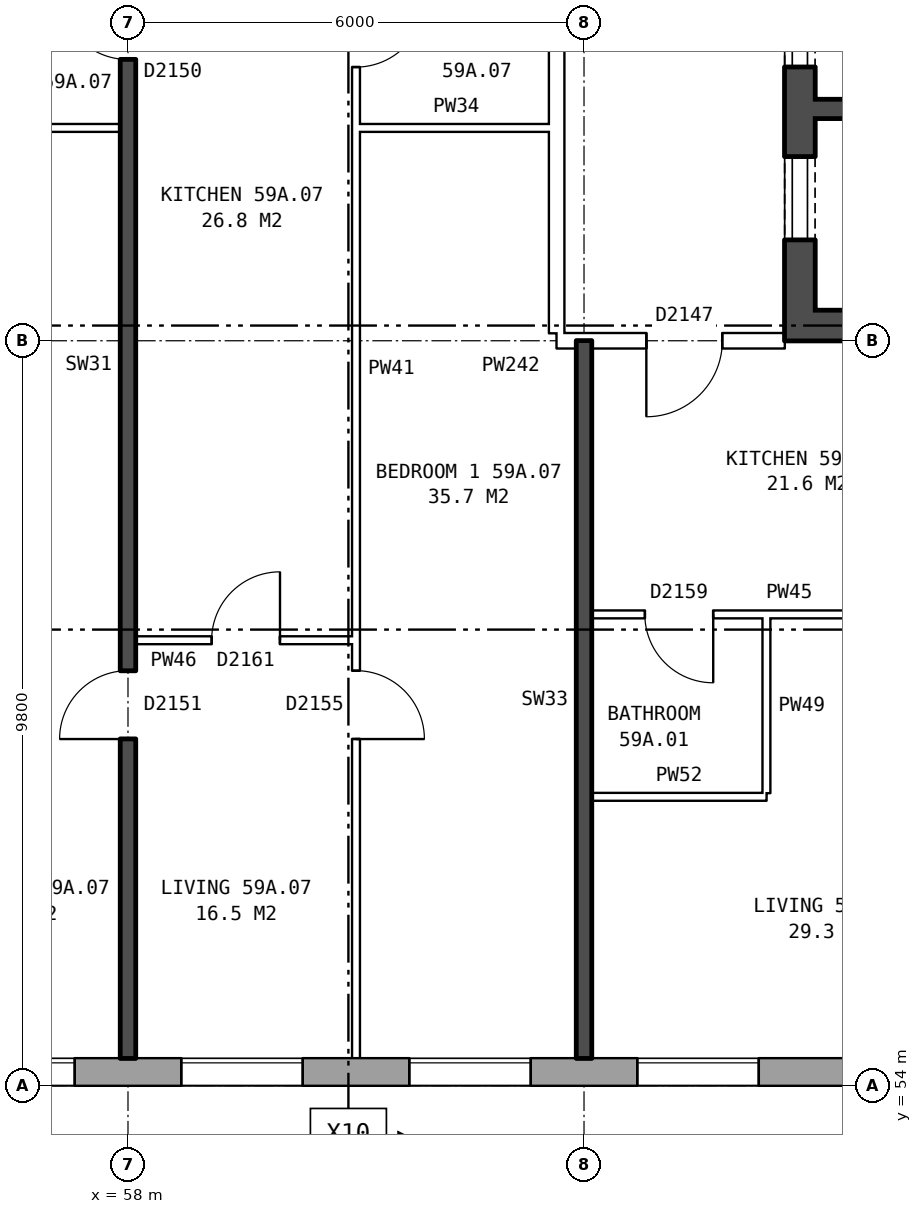
"""IFC4 building model, lengths in metres.
Left out: names, types, materials, properties, quantities, classifications, styles, units other than length and angle.
Written with IfcOpenShell. Run it as: python <this file> out.ifc"""

import sys

from ifc_helpers import new_model, si_unit, direction, frame, frame_2d, origin, place, context, subcontext, project, spatial, rectangle, extrude, element, fill, save


model = new_model("IFC4")
c1 = context("Model", 3, precision=1e-05, world=origin(), true_north=direction((0.0, 1.0)))
c2 = subcontext(c1, "Body", "Model", "MODEL_VIEW")
j1 = project(units=[si_unit("LENGTHUNIT", "METRE"), si_unit("PLANEANGLEUNIT", "RADIAN")], contexts=[c1])
p1 = place(None, origin())
s1 = spatial("IfcSite", under=j1, at=p1, CompositionType="ELEMENT")
p2 = place(p1, origin())
s2 = spatial("IfcBuilding", under=s1, at=p2, CompositionType="ELEMENT")
p3 = place(p2, frame((0.0, 0.0, 209.0)))
s3 = spatial("IfcBuildingStorey", under=s2, at=p3, CompositionType="ELEMENT", Elevation=209.0)
p4 = place(p3, frame((35.075, 54.18, 0.0), z_axis=(0.0, 0.0, 1.0), x_axis=(1.0, 0.0, 0.0)))
e1 = element("IfcWall", 1, at=p4, inside=s3, PredefinedType="STANDARD", context=c2, shape_type="SweptSolid", body=[
    extrude(rectangle(XDim=39.875, YDim=0.36, at=frame_2d((19.938, 0.0))), origin(), (0.0, 0.0, 1.0), 2.85),
])
p5 = place(p4, frame((0.3, 0.0, 0.8)))
e2 = element("IfcOpeningElement", 2, at=p5, cuts=e1, PredefinedType="OPENING", context=c2, shape_type="SweptSolid", body=[
    extrude(rectangle(XDim=1.0, YDim=1.8, at=frame_2d((0.5, 0.9))), frame((0.0, 0.19, 0.0), z_axis=(0.0, -1.0, 0.0), x_axis=(1.0, 0.0, 0.0)), (0.0, 0.0, 1.0), 0.38),
])
p6 = place(p4, frame((5.625, 0.0, 0.8)))
e3 = element("IfcOpeningElement", 3, at=p6, cuts=e1, PredefinedType="OPENING", context=c2, shape_type="SweptSolid", body=[
    extrude(rectangle(XDim=1.6, YDim=1.8, at=frame_2d((0.8, 0.9))), frame((0.0, 0.19, 0.0), z_axis=(0.0, -1.0, 0.0), x_axis=(1.0, 0.0, 0.0)), (0.0, 0.0, 1.0), 0.38),
])
p7 = place(p4, frame((8.625, 0.0, 0.8)))
e4 = element("IfcOpeningElement", 4, at=p7, cuts=e1, PredefinedType="OPENING", context=c2, shape_type="SweptSolid", body=[
    extrude(rectangle(XDim=1.6, YDim=1.8, at=frame_2d((0.8, 0.9))), frame((0.0, 0.19, 0.0), z_axis=(0.0, -1.0, 0.0), x_axis=(1.0, 0.0, 0.0)), (0.0, 0.0, 1.0), 0.38),
])
p8 = place(p4, frame((11.625, 0.0, 0.8)))
e5 = element("IfcOpeningElement", 5, at=p8, cuts=e1, PredefinedType="OPENING", context=c2, shape_type="SweptSolid", body=[
    extrude(rectangle(XDim=1.6, YDim=1.8, at=frame_2d((0.8, 0.9))), frame((0.0, 0.19, 0.0), z_axis=(0.0, -1.0, 0.0), x_axis=(1.0, 0.0, 0.0)), (0.0, 0.0, 1.0), 0.38),
])
p9 = place(p4, frame((14.625, 0.0, 0.8)))
e6 = element("IfcOpeningElement", 6, at=p9, cuts=e1, PredefinedType="OPENING", context=c2, shape_type="SweptSolid", body=[
    extrude(rectangle(XDim=1.6, YDim=1.8, at=frame_2d((0.8, 0.9))), frame((0.0, 0.19, 0.0), z_axis=(0.0, -1.0, 0.0), x_axis=(1.0, 0.0, 0.0)), (0.0, 0.0, 1.0), 0.38),
])
p10 = place(p4, frame((17.625, 0.0, 0.8)))
e7 = element("IfcOpeningElement", 7, at=p10, cuts=e1, PredefinedType="OPENING", context=c2, shape_type="SweptSolid", body=[
    extrude(rectangle(XDim=1.6, YDim=1.8, at=frame_2d((0.8, 0.9))), frame((0.0, 0.19, 0.0), z_axis=(0.0, -1.0, 0.0), x_axis=(1.0, 0.0, 0.0)), (0.0, 0.0, 1.0), 0.38),
])
p11 = place(p4, frame((20.625, 0.0, 0.8)))
e8 = element("IfcOpeningElement", 8, at=p11, cuts=e1, PredefinedType="OPENING", context=c2, shape_type="SweptSolid", body=[
    extrude(rectangle(XDim=1.6, YDim=1.8, at=frame_2d((0.8, 0.9))), frame((0.0, 0.19, 0.0), z_axis=(0.0, -1.0, 0.0), x_axis=(1.0, 0.0, 0.0)), (0.0, 0.0, 1.0), 0.38),
])
p12 = place(p4, frame((23.625, 0.0, 0.8)))
e9 = element("IfcOpeningElement", 9, at=p12, cuts=e1, PredefinedType="OPENING", context=c2, shape_type="SweptSolid", body=[
    extrude(rectangle(XDim=1.6, YDim=1.8, at=frame_2d((0.8, 0.9))), frame((0.0, 0.19, 0.0), z_axis=(0.0, -1.0, 0.0), x_axis=(1.0, 0.0, 0.0)), (0.0, 0.0, 1.0), 0.38),
])
p13 = place(p4, frame((26.625, 0.0, 0.8)))
e10 = element("IfcOpeningElement", 10, at=p13, cuts=e1, PredefinedType="OPENING", context=c2, shape_type="SweptSolid", body=[
    extrude(rectangle(XDim=1.6, YDim=1.8, at=frame_2d((0.8, 0.9))), frame((0.0, 0.19, 0.0), z_axis=(0.0, -1.0, 0.0), x_axis=(1.0, 0.0, 0.0)), (0.0, 0.0, 1.0), 0.38),
])
p14 = place(p4, frame((29.625, 0.0, 0.8)))
e11 = element("IfcOpeningElement", 11, at=p14, cuts=e1, PredefinedType="OPENING", context=c2, shape_type="SweptSolid", body=[
    extrude(rectangle(XDim=1.6, YDim=1.8, at=frame_2d((0.8, 0.9))), frame((0.0, 0.19, 0.0), z_axis=(0.0, -1.0, 0.0), x_axis=(1.0, 0.0, 0.0)), (0.0, 0.0, 1.0), 0.38),
])
p15 = place(p4, frame((32.625, 0.0, 0.8)))
e12 = element("IfcOpeningElement", 12, at=p15, cuts=e1, PredefinedType="OPENING", context=c2, shape_type="SweptSolid", body=[
    extrude(rectangle(XDim=1.6, YDim=1.8, at=frame_2d((0.8, 0.9))), frame((0.0, 0.19, 0.0), z_axis=(0.0, -1.0, 0.0), x_axis=(1.0, 0.0, 0.0)), (0.0, 0.0, 1.0), 0.38),
])
p16 = place(p4, frame((36.325, 0.0, 1.1)))
e13 = element("IfcOpeningElement", 13, at=p16, cuts=e1, PredefinedType="OPENING", context=c2, shape_type="SweptSolid", body=[
    extrude(rectangle(XDim=0.8, YDim=1.5, at=frame_2d((0.4, 0.75))), frame((0.0, 0.19, 0.0), z_axis=(0.0, -1.0, 0.0), x_axis=(1.0, 0.0, 0.0)), (0.0, 0.0, 1.0), 0.38),
])
p17 = place(p4, frame((3.65, 0.0, 0.8)))
e14 = element("IfcOpeningElement", 14, at=p17, cuts=e1, PredefinedType="OPENING", context=c2, shape_type="SweptSolid", body=[
    extrude(rectangle(XDim=1.0, YDim=1.8, at=frame_2d((0.5, 0.9))), frame((0.0, 0.19, 0.0), z_axis=(0.0, -1.0, 0.0), x_axis=(1.0, 0.0, 0.0)), (0.0, 0.0, 1.0), 0.38),
])
p18 = place(p4, frame((37.425, 0.0, 0.8)))
e15 = element("IfcOpeningElement", 15, at=p18, cuts=e1, PredefinedType="OPENING", context=c2, shape_type="SweptSolid", body=[
    extrude(rectangle(XDim=1.4, YDim=1.8, at=frame_2d((0.7, 0.9))), frame((0.0, 0.19, 0.0), z_axis=(0.0, -1.0, 0.0), x_axis=(1.0, 0.0, 0.0)), (0.0, 0.0, 1.0), 0.38),
])
p19 = place(p3, frame((66.84, 63.8, 0.0), z_axis=(0.0, 0.0, 1.0), x_axis=(0.0, 1.0, 0.0)))
e16 = element("IfcWall", 16, at=p19, inside=s3, PredefinedType="SHEAR", context=c2, shape_type="SweptSolid", body=[
    extrude(rectangle(XDim=12.4, YDim=0.4, at=frame_2d((6.2, 0.0))), origin(), (0.0, 0.0, 1.0), 2.85),
])
p20 = place(p19, frame((1.325, 0.0, 0.0)))
e17 = element("IfcOpeningElement", 17, at=p20, cuts=e16, PredefinedType="OPENING", context=c2, shape_type="SweptSolid", body=[
    extrude(rectangle(XDim=1.1, YDim=2.1, at=frame_2d((0.55, 1.05))), frame((0.0, 0.21, 0.0), z_axis=(0.0, -1.0, 0.0), x_axis=(1.0, 0.0, 0.0)), (0.0, 0.0, 1.0), 0.42),
])
p21 = place(p19, frame((3.6, 0.0, 0.0)))
e18 = element("IfcOpeningElement", 18, at=p21, cuts=e16, PredefinedType="OPENING", context=c2, shape_type="SweptSolid", body=[
    extrude(rectangle(XDim=1.1, YDim=2.1, at=frame_2d((0.55, 1.05))), frame((0.0, 0.21, 0.0), z_axis=(0.0, -1.0, 0.0), x_axis=(1.0, 0.0, 0.0)), (0.0, 0.0, 1.0), 0.42),
])
p22 = place(p19, frame((5.8, 0.0, 0.0)))
e19 = element("IfcOpeningElement", 19, at=p22, cuts=e16, PredefinedType="OPENING", context=c2, shape_type="SweptSolid", body=[
    extrude(rectangle(XDim=1.1, YDim=2.1, at=frame_2d((0.55, 1.05))), frame((0.0, 0.21, 0.0), z_axis=(0.0, -1.0, 0.0), x_axis=(1.0, 0.0, 0.0)), (0.0, 0.0, 1.0), 0.42),
])
p23 = place(p19, frame((8.0, 0.0, 0.0)))
e20 = element("IfcOpeningElement", 20, at=p23, cuts=e16, PredefinedType="OPENING", context=c2, shape_type="SweptSolid", body=[
    extrude(rectangle(XDim=1.1, YDim=2.1, at=frame_2d((0.55, 1.05))), frame((0.0, 0.21, 0.0), z_axis=(0.0, -1.0, 0.0), x_axis=(1.0, 0.0, 0.0)), (0.0, 0.0, 1.0), 0.42),
])
p24 = place(p19, frame((9.9, 0.0, 0.0)))
e21 = element("IfcOpeningElement", 21, at=p24, cuts=e16, PredefinedType="OPENING", context=c2, shape_type="SweptSolid", body=[
    extrude(rectangle(XDim=1.1, YDim=2.1, at=frame_2d((0.55, 1.05))), frame((0.0, 0.21, 0.0), z_axis=(0.0, -1.0, 0.0), x_axis=(1.0, 0.0, 0.0)), (0.0, 0.0, 1.0), 0.42),
])
p25 = place(p3, frame((67.04, 64.0, 0.0), z_axis=(0.0, 0.0, 1.0), x_axis=(1.0, 0.0, 0.0)))
e22 = element("IfcWall", 22, at=p25, inside=s3, PredefinedType="SHEAR", context=c2, shape_type="SweptSolid", body=[
    extrude(rectangle(XDim=8.2, YDim=0.4, at=frame_2d((4.1, 0.0))), origin(), (0.0, 0.0, 1.0), 2.85),
])
p26 = place(p3, frame((67.04, 66.85, 0.0), z_axis=(0.0, 0.0, 1.0), x_axis=(1.0, 0.0, 0.0)))
e23 = element("IfcWall", 23, at=p26, inside=s3, PredefinedType="SHEAR", context=c2, shape_type="SweptSolid", body=[
    extrude(rectangle(XDim=3.595, YDim=0.25, at=frame_2d((1.797, 0.0))), origin(), (0.0, 0.0, 1.0), 2.85),
])
p27 = place(p3, frame((63.64, 63.9, 0.0), z_axis=(0.0, 0.0, 1.0), x_axis=(0.0, 1.0, 0.0)))
e24 = element("IfcWall", 24, at=p27, inside=s3, PredefinedType="PARTITIONING", context=c2, shape_type="SweptSolid", body=[
    extrude(rectangle(XDim=12.2, YDim=0.2, at=frame_2d((6.1, 0.0))), origin(), (0.0, 0.0, 1.0), 2.85),
])
p28 = place(p27, frame((5.1, 0.0, 0.0)))
e25 = element("IfcOpeningElement", 25, at=p28, cuts=e24, PredefinedType="OPENING", context=c2, shape_type="SweptSolid", body=[
    extrude(rectangle(XDim=2.0, YDim=2.1, at=frame_2d((1.0, 1.05))), frame((0.0, 0.11, 0.0), z_axis=(0.0, -1.0, 0.0), x_axis=(1.0, 0.0, 0.0)), (0.0, 0.0, 1.0), 0.22),
])
p29 = place(p3, frame((64.1, 57.8, 0.0), z_axis=(0.0, 0.0, 1.0), x_axis=(1.0, 0.0, 0.0)))
e26 = element("IfcWall", 26, at=p29, inside=s3, PredefinedType="PARTITIONING", context=c2, shape_type="SweptSolid", body=[
    extrude(rectangle(XDim=2.3, YDim=0.1, at=frame_2d((1.15, 0.0))), origin(), (0.0, 0.0, 1.0), 2.85),
])
p30 = place(p3, frame((58.1, 59.86, 0.0), z_axis=(0.0, 0.0, 1.0), x_axis=(1.0, 0.0, 0.0)))
e27 = element("IfcWall", 27, at=p30, inside=s3, PredefinedType="PARTITIONING", context=c2, shape_type="SweptSolid", body=[
    extrude(rectangle(XDim=2.9, YDim=0.1, at=frame_2d((1.45, 0.0))), origin(), (0.0, 0.0, 1.0), 2.85),
])
p31 = place(p30, frame((1.0, 0.0, 0.0)))
e28 = element("IfcOpeningElement", 28, at=p31, cuts=e27, PredefinedType="OPENING", context=c2, shape_type="SweptSolid", body=[
    extrude(rectangle(XDim=0.9, YDim=2.1, at=frame_2d((0.45, 1.05))), frame((0.0, 0.06, 0.0), z_axis=(0.0, -1.0, 0.0), x_axis=(1.0, 0.0, 0.0)), (0.0, 0.0, 1.0), 0.12),
])
p32 = place(p3, frame((64.1, 60.2, 0.0), z_axis=(0.0, 0.0, 1.0), x_axis=(1.0, 0.0, 0.0)))
e29 = element("IfcWall", 29, at=p32, inside=s3, PredefinedType="PARTITIONING", context=c2, shape_type="SweptSolid", body=[
    extrude(rectangle(XDim=5.8, YDim=0.1, at=frame_2d((2.9, 0.0))), origin(), (0.0, 0.0, 1.0), 2.85),
])
p33 = place(p32, frame((3.6, 0.0, 0.0)))
e30 = element("IfcOpeningElement", 30, at=p33, cuts=e29, PredefinedType="OPENING", context=c2, shape_type="SweptSolid", body=[
    extrude(rectangle(XDim=0.9, YDim=2.1, at=frame_2d((0.45, 1.05))), frame((0.0, 0.06, 0.0), z_axis=(0.0, -1.0, 0.0), x_axis=(1.0, 0.0, 0.0)), (0.0, 0.0, 1.0), 0.12),
])
p34 = place(p32, frame((0.7, 0.0, 0.0)))
e31 = element("IfcOpeningElement", 31, at=p34, cuts=e29, PredefinedType="OPENING", context=c2, shape_type="SweptSolid", body=[
    extrude(rectangle(XDim=0.9, YDim=2.1, at=frame_2d((0.45, 1.05))), frame((0.0, 0.06, 0.0), z_axis=(0.0, -1.0, 0.0), x_axis=(1.0, 0.0, 0.0)), (0.0, 0.0, 1.0), 0.12),
])
p35 = place(p3, frame((63.64, 63.8, 0.0), z_axis=(0.0, 0.0, 1.0), x_axis=(1.0, 0.0, 0.0)))
e32 = element("IfcWall", 32, at=p35, inside=s3, PredefinedType="PARTITIONING", context=c2, shape_type="SweptSolid", body=[
    extrude(rectangle(XDim=3.0, YDim=0.2, at=frame_2d((1.5, 0.0))), origin(), (0.0, 0.0, 1.0), 2.85),
])
p36 = place(p35, frame((1.18, 0.0, 0.0)))
e33 = element("IfcOpeningElement", 33, at=p36, cuts=e32, PredefinedType="OPENING", context=c2, shape_type="SweptSolid", body=[
    extrude(rectangle(XDim=1.0, YDim=2.1, at=frame_2d((0.5, 1.05))), frame((0.0, 0.11, 0.0), z_axis=(0.0, -1.0, 0.0), x_axis=(1.0, 0.0, 0.0)), (0.0, 0.0, 1.0), 0.22),
])
p37 = place(p3, frame((52.1, 66.6, 0.0), z_axis=(0.0, 0.0, 1.0), x_axis=(1.0, 0.0, 0.0)))
e34 = element("IfcWall", 34, at=p37, inside=s3, PredefinedType="PARTITIONING", context=c2, shape_type="SweptSolid", body=[
    extrude(rectangle(XDim=5.8, YDim=0.1, at=frame_2d((2.9, 0.0))), origin(), (0.0, 0.0, 1.0), 2.85),
])
p38 = place(p3, frame((61.0, 66.6, 0.0), z_axis=(0.0, 0.0, 1.0), x_axis=(1.0, 0.0, 0.0)))
e35 = element("IfcWall", 35, at=p38, inside=s3, PredefinedType="PARTITIONING", context=c2, shape_type="SweptSolid", body=[
    extrude(rectangle(XDim=2.64, YDim=0.1, at=frame_2d((1.32, 0.0))), origin(), (0.0, 0.0, 1.0), 2.85),
])
p39 = place(p3, frame((58.0, 54.36, 0.0), z_axis=(0.0, 0.0, 1.0), x_axis=(0.0, 1.0, 0.0)))
e36 = element("IfcWall", 36, at=p39, inside=s3, PredefinedType="SOLIDWALL", context=c2, shape_type="SweptSolid", body=[
    extrude(rectangle(XDim=14.44, YDim=0.2, at=frame_2d((7.22, 0.0))), origin(), (0.0, 0.0, 1.0), 2.85),
])
p40 = place(p39, frame((4.2, 0.0, 0.0)))
e37 = element("IfcOpeningElement", 37, at=p40, cuts=e36, PredefinedType="OPENING", context=c2, shape_type="SweptSolid", body=[
    extrude(rectangle(XDim=0.9, YDim=2.1, at=frame_2d((0.45, 1.05))), frame((0.0, 0.11, 0.0), z_axis=(0.0, -1.0, 0.0), x_axis=(1.0, 0.0, 0.0)), (0.0, 0.0, 1.0), 0.22),
])
p41 = place(p39, frame((13.14, 0.0, 0.0)))
e38 = element("IfcOpeningElement", 38, at=p41, cuts=e36, PredefinedType="OPENING", context=c2, shape_type="SweptSolid", body=[
    extrude(rectangle(XDim=0.9, YDim=2.1, at=frame_2d((0.45, 1.05))), frame((0.0, 0.11, 0.0), z_axis=(0.0, -1.0, 0.0), x_axis=(1.0, 0.0, 0.0)), (0.0, 0.0, 1.0), 0.22),
])
p42 = place(p3, frame((61.0, 54.36, 0.0), z_axis=(0.0, 0.0, 1.0), x_axis=(0.0, 1.0, 0.0)))
e39 = element("IfcWall", 39, at=p42, inside=s3, PredefinedType="PARTITIONING", context=c2, shape_type="SweptSolid", body=[
    extrude(rectangle(XDim=14.34, YDim=0.1, at=frame_2d((7.17, 0.0))), origin(), (0.0, 0.0, 1.0), 2.85),
])
p43 = place(p42, frame((4.2, 0.0, 0.0)))
e40 = element("IfcOpeningElement", 40, at=p43, cuts=e39, PredefinedType="OPENING", context=c2, shape_type="SweptSolid", body=[
    extrude(rectangle(XDim=0.9, YDim=2.1, at=frame_2d((0.45, 1.05))), frame((0.0, 0.06, 0.0), z_axis=(0.0, -1.0, 0.0), x_axis=(1.0, 0.0, 0.0)), (0.0, 0.0, 1.0), 0.12),
])
p44 = place(p42, frame((13.04, 0.0, 0.0)))
e41 = element("IfcOpeningElement", 41, at=p44, cuts=e39, PredefinedType="OPENING", context=c2, shape_type="SweptSolid", body=[
    extrude(rectangle(XDim=0.9, YDim=2.1, at=frame_2d((0.45, 1.05))), frame((0.0, 0.06, 0.0), z_axis=(0.0, -1.0, 0.0), x_axis=(1.0, 0.0, 0.0)), (0.0, 0.0, 1.0), 0.12),
])
p45 = place(p3, frame((64.0, 54.36, 0.0), z_axis=(0.0, 0.0, 1.0), x_axis=(0.0, 1.0, 0.0)))
e42 = element("IfcWall", 42, at=p45, inside=s3, PredefinedType="SOLIDWALL", context=c2, shape_type="SweptSolid", body=[
    extrude(rectangle(XDim=9.44, YDim=0.2, at=frame_2d((4.72, 0.0))), origin(), (0.0, 0.0, 1.0), 2.85),
])
p46 = place(p3, frame((66.4, 57.85, 0.0), z_axis=(0.0, 0.0, 1.0), x_axis=(0.0, 1.0, 0.0)))
e43 = element("IfcWall", 43, at=p46, inside=s3, PredefinedType="PARTITIONING", context=c2, shape_type="SweptSolid", body=[
    extrude(rectangle(XDim=2.3, YDim=0.1, at=frame_2d((1.15, 0.0))), origin(), (0.0, 0.0, 1.0), 2.85),
])
p47 = place(p11, origin())
e44 = element("IfcWindow", 44, at=p47, inside=s3, PartitioningType="SINGLE_PANEL", PredefinedType="WINDOW", context=c2, shape_type="SweptSolid", body=[
    extrude(rectangle(XDim=1.6, YDim=1.8, at=frame_2d((0.8, 0.9))), frame((0.0, 0.15, 0.0), z_axis=(0.0, -1.0, 0.0), x_axis=(1.0, 0.0, 0.0)), (0.0, 0.0, 1.0), 0.06),
])
fill(e8, e44)
p48 = place(p12, origin())
e45 = element("IfcWindow", 45, at=p48, inside=s3, PartitioningType="SINGLE_PANEL", PredefinedType="WINDOW", context=c2, shape_type="SweptSolid", body=[
    extrude(rectangle(XDim=1.6, YDim=1.8, at=frame_2d((0.8, 0.9))), frame((0.0, 0.15, 0.0), z_axis=(0.0, -1.0, 0.0), x_axis=(1.0, 0.0, 0.0)), (0.0, 0.0, 1.0), 0.06),
])
fill(e9, e45)
p49 = place(p13, origin())
e46 = element("IfcWindow", 46, at=p49, inside=s3, PartitioningType="SINGLE_PANEL", PredefinedType="WINDOW", context=c2, shape_type="SweptSolid", body=[
    extrude(rectangle(XDim=1.6, YDim=1.8, at=frame_2d((0.8, 0.9))), frame((0.0, 0.15, 0.0), z_axis=(0.0, -1.0, 0.0), x_axis=(1.0, 0.0, 0.0)), (0.0, 0.0, 1.0), 0.06),
])
fill(e10, e46)
p50 = place(p14, origin())
e47 = element("IfcWindow", 47, at=p50, inside=s3, PartitioningType="SINGLE_PANEL", PredefinedType="WINDOW", context=c2, shape_type="SweptSolid", body=[
    extrude(rectangle(XDim=1.6, YDim=1.8, at=frame_2d((0.8, 0.9))), frame((0.0, 0.15, 0.0), z_axis=(0.0, -1.0, 0.0), x_axis=(1.0, 0.0, 0.0)), (0.0, 0.0, 1.0), 0.06),
])
fill(e11, e47)
p51 = place(p20, origin())
e48 = element("IfcDoor", 48, at=p51, inside=s3, OperationType="DOUBLE_DOOR_SLIDING", PredefinedType="DOOR", context=c2, shape_type="SweptSolid", body=[
    extrude(rectangle(XDim=1.1, YDim=2.1, at=frame_2d((0.55, 1.05))), frame((0.0, -0.135, 0.0), z_axis=(0.0, -1.0, 0.0), x_axis=(1.0, 0.0, 0.0)), (0.0, 0.0, 1.0), 0.05),
])
fill(e17, e48)
p52 = place(p21, origin())
e49 = element("IfcDoor", 49, at=p52, inside=s3, OperationType="DOUBLE_DOOR_SLIDING", PredefinedType="DOOR", context=c2, shape_type="SweptSolid", body=[
    extrude(rectangle(XDim=1.1, YDim=2.1, at=frame_2d((0.55, 1.05))), frame((0.0, -0.135, 0.0), z_axis=(0.0, -1.0, 0.0), x_axis=(1.0, 0.0, 0.0)), (0.0, 0.0, 1.0), 0.05),
])
fill(e18, e49)
p53 = place(p36, frame((1.0, 0.0, 0.0), z_axis=(0.0, 0.0, 1.0), x_axis=(-1.0, 0.0, 0.0)))
e50 = element("IfcDoor", 50, at=p53, inside=s3, OperationType="SINGLE_SWING_RIGHT", PredefinedType="DOOR", context=c2, shape_type="SweptSolid", body=[
    extrude(rectangle(XDim=1.0, YDim=2.1, at=frame_2d((0.5, 1.05))), frame((0.0, 0.025, 0.0), z_axis=(0.0, -1.0, 0.0), x_axis=(1.0, 0.0, 0.0)), (0.0, 0.0, 1.0), 0.05),
])
fill(e33, e50)
p54 = place(p34, frame((0.9, 0.0, 0.0), z_axis=(0.0, 0.0, 1.0), x_axis=(-1.0, 0.0, 0.0)))
e51 = element("IfcDoor", 51, at=p54, inside=s3, OperationType="SINGLE_SWING_LEFT", PredefinedType="DOOR", context=c2, shape_type="SweptSolid", body=[
    extrude(rectangle(XDim=0.9, YDim=2.1, at=frame_2d((0.45, 1.05))), frame((0.0, 0.025, 0.0), z_axis=(0.0, -1.0, 0.0), x_axis=(1.0, 0.0, 0.0)), (0.0, 0.0, 1.0), 0.05),
])
fill(e31, e51)
p55 = place(p43, frame((0.9, 0.0, 0.0), z_axis=(0.0, 0.0, 1.0), x_axis=(-1.0, 0.0, 0.0)))
e52 = element("IfcDoor", 52, at=p55, inside=s3, OperationType="SINGLE_SWING_RIGHT", PredefinedType="DOOR", context=c2, shape_type="SweptSolid", body=[
    extrude(rectangle(XDim=0.9, YDim=2.1, at=frame_2d((0.45, 1.05))), frame((0.0, 0.025, 0.0), z_axis=(0.0, -1.0, 0.0), x_axis=(1.0, 0.0, 0.0)), (0.0, 0.0, 1.0), 0.05),
])
fill(e40, e52)
p56 = place(p40, origin())
e53 = element("IfcDoor", 53, at=p56, inside=s3, OperationType="SINGLE_SWING_LEFT", PredefinedType="DOOR", context=c2, shape_type="SweptSolid", body=[
    extrude(rectangle(XDim=0.9, YDim=2.1, at=frame_2d((0.45, 1.05))), frame((0.0, 0.025, 0.0), z_axis=(0.0, -1.0, 0.0), x_axis=(1.0, 0.0, 0.0)), (0.0, 0.0, 1.0), 0.05),
])
fill(e37, e53)
p57 = place(p31, origin())
e54 = element("IfcDoor", 54, at=p57, inside=s3, OperationType="SINGLE_SWING_RIGHT", PredefinedType="DOOR", context=c2, shape_type="SweptSolid", body=[
    extrude(rectangle(XDim=0.9, YDim=2.1, at=frame_2d((0.45, 1.05))), frame((0.0, 0.025, 0.0), z_axis=(0.0, -1.0, 0.0), x_axis=(1.0, 0.0, 0.0)), (0.0, 0.0, 1.0), 0.05),
])
fill(e28, e54)
p58 = place(p44, frame((0.9, 0.0, 0.0), z_axis=(0.0, 0.0, 1.0), x_axis=(-1.0, 0.0, 0.0)))
e55 = element("IfcDoor", 55, at=p58, inside=s3, OperationType="SINGLE_SWING_LEFT", PredefinedType="DOOR", context=c2, shape_type="SweptSolid", body=[
    extrude(rectangle(XDim=0.9, YDim=2.1, at=frame_2d((0.45, 1.05))), frame((0.0, 0.025, 0.0), z_axis=(0.0, -1.0, 0.0), x_axis=(1.0, 0.0, 0.0)), (0.0, 0.0, 1.0), 0.05),
])
fill(e41, e55)
p59 = place(p41, origin())
e56 = element("IfcDoor", 56, at=p59, inside=s3, OperationType="SINGLE_SWING_RIGHT", PredefinedType="DOOR", context=c2, shape_type="SweptSolid", body=[
    extrude(rectangle(XDim=0.9, YDim=2.1, at=frame_2d((0.45, 1.05))), frame((0.0, 0.025, 0.0), z_axis=(0.0, -1.0, 0.0), x_axis=(1.0, 0.0, 0.0)), (0.0, 0.0, 1.0), 0.05),
])
fill(e38, e56)
save(model, sys.argv[1])
